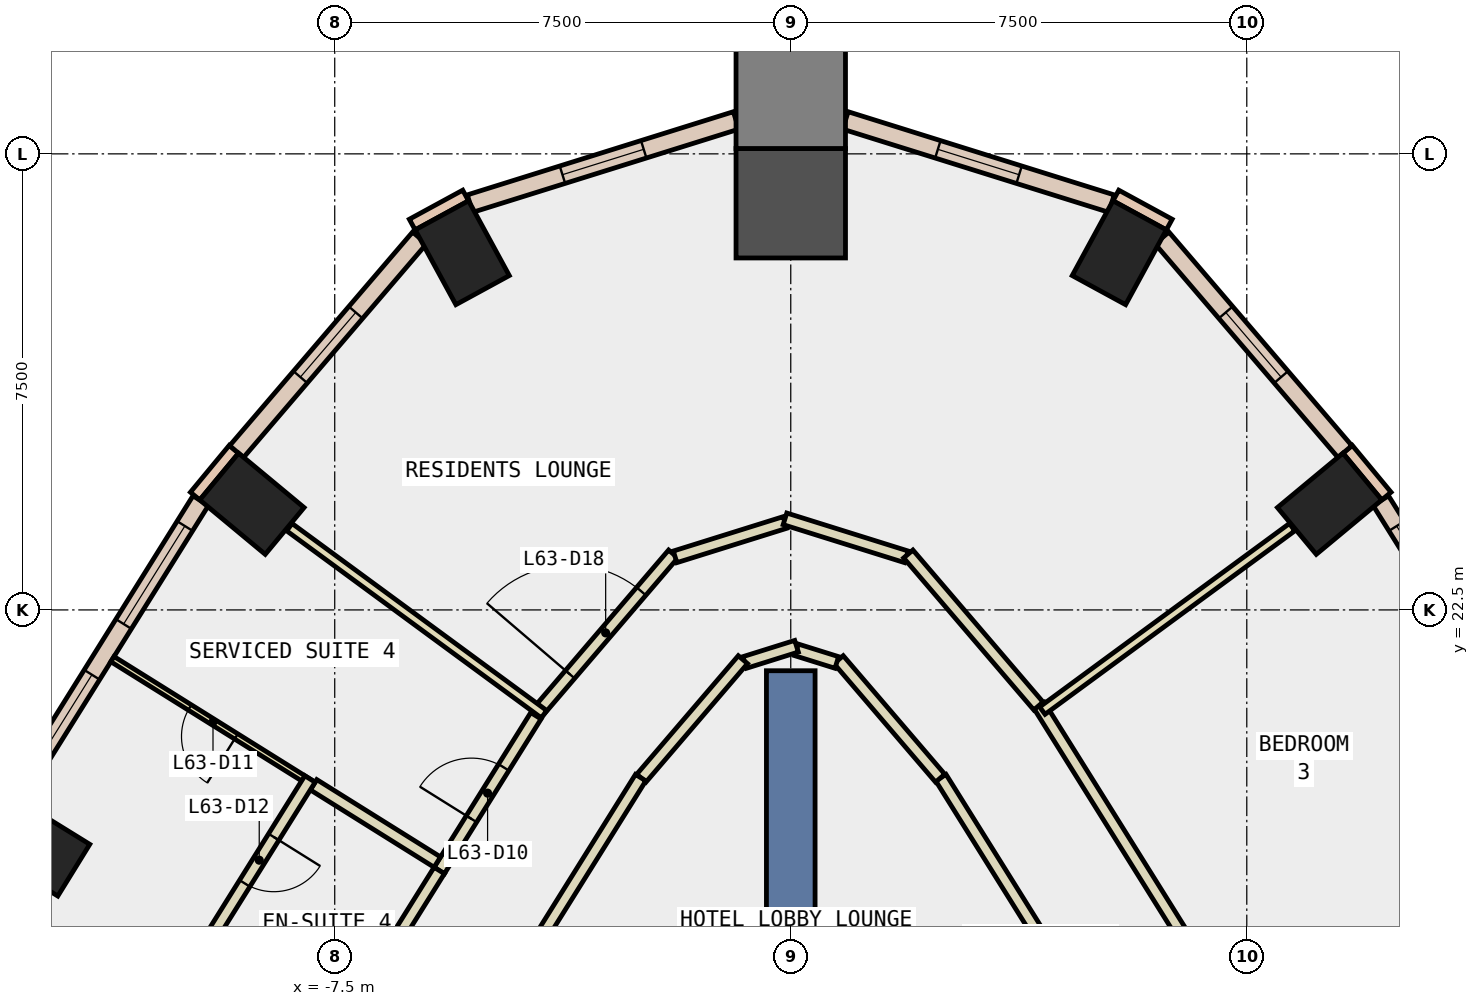
"""IFC4 building model, lengths in metres.
Left out: names, types, materials, properties, quantities, classifications, styles, units other than length and angle.
Written with IfcOpenShell. Run it as: python <this file> out.ifc"""

import sys

from ifc_helpers import new_model, si_unit, direction, frame, frame_2d, origin, origin_2d, place, context, subcontext, project, spatial, rectangle, extrude, element, fill, save


model = new_model("IFC4")
c1 = context("Model", 3, precision=1e-05, world=origin(), true_north=direction((0.0, 1.0)))
c2 = subcontext(c1, "Body", "Model", "MODEL_VIEW")
j1 = project(units=[si_unit("LENGTHUNIT", "METRE"), si_unit("PLANEANGLEUNIT", "RADIAN")], contexts=[c1])
p1 = place(None, origin())
s1 = spatial("IfcSite", under=j1, at=p1, CompositionType="ELEMENT")
p2 = place(p1, origin())
s2 = spatial("IfcBuilding", under=s1, at=p2, CompositionType="ELEMENT")
p3 = place(p2, frame((0.0, 0.0, 273.8)))
s3 = spatial("IfcBuildingStorey", under=s2, at=p3, CompositionType="ELEMENT", Elevation=273.8)
for number, where, z_axis, x_axis in (
    (1, (8.862, 24.246, -0.34), (0.0, 0.0, 1.0), (-0.639, 0.769, 0.0)),
    (2, (5.403, 28.374, -0.34), (0.0, 0.0, 1.0), (-0.878, 0.478, 0.0)),
):
    element("IfcColumn", number, at=place(p3, frame(where, z_axis=z_axis, x_axis=x_axis)), inside=s3, PredefinedType="COLUMN", context=c2, shape_type="SweptSolid", body=[
        extrude(rectangle(XDim=1.0, YDim=1.4, at=origin_2d()), origin(), (0.0, 0.0, 1.0), 3.6),
    ])
p4 = place(p3, frame((0.0, 29.188, -0.34), z_axis=(0.0, 0.0, 1.0), x_axis=(0.0, 1.0, 0.0)))
e3 = element("IfcColumn", 3, at=p4, inside=s3, PredefinedType="COLUMN", context=c2, shape_type="SweptSolid", body=[
    extrude(rectangle(XDim=1.8, YDim=1.8, at=origin_2d()), origin(), (0.0, 0.0, 1.0), 3.6),
])
for number, where, z_axis, x_axis in (
    (4, (-5.403, 28.374, -0.34), (0.0, 0.0, 1.0), (0.878, 0.478, 0.0)),
    (5, (-8.862, 24.246, -0.34), (0.0, 0.0, 1.0), (0.639, 0.769, 0.0)),
    (6, (-12.387, 18.588, -0.34), (0.0, 0.0, 1.0), (0.526, 0.851, 0.0)),
):
    element("IfcColumn", number, at=place(p3, frame(where, z_axis=z_axis, x_axis=x_axis)), inside=s3, PredefinedType="COLUMN", context=c2, shape_type="SweptSolid", body=[
        extrude(rectangle(XDim=1.0, YDim=1.4, at=origin_2d()), origin(), (0.0, 0.0, 1.0), 3.6),
    ])
p5 = place(p3, frame((0.0, 30.988, -0.34), z_axis=(0.0, 0.0, 1.0), x_axis=(0.0, 1.0, 0.0)))
e7 = element("IfcColumn", 7, at=p5, inside=s3, PredefinedType="COLUMN", context=c2, shape_type="SweptSolid", body=[
    extrude(rectangle(XDim=1.8, YDim=1.8, at=origin_2d()), origin(), (0.0, 0.0, 1.0), 3.6),
])
p6 = place(p3, frame((0.0, 12.5, -0.34), z_axis=(0.0, 0.0, 1.0), x_axis=(0.0, 1.0, 0.0)))
e8 = element("IfcWall", 8, at=p6, inside=s3, PredefinedType="SHEAR", context=c2, shape_type="SweptSolid", body=[
    extrude(rectangle(XDim=9.0, YDim=0.8, at=frame_2d((4.5, 0.0))), origin(), (0.0, 0.0, 1.0), 3.6),
])
for number, where, z_axis, x_axis in (
    (9, (6.225, 28.837, 0.0), (0.0, 0.0, 1.0), (-0.878, 0.478, 0.0)),
    (10, (-5.347, 29.315, 0.0), (0.0, 0.0, 1.0), (-0.878, -0.478, 0.0)),
):
    element("IfcWall", number, at=place(p3, frame(where, z_axis=z_axis, x_axis=x_axis)), inside=s3, PredefinedType="STANDARD", context=c2, shape_type="SweptSolid", body=[
        extrude(rectangle(XDim=1.0, YDim=0.2, at=frame_2d((0.5, 0.0))), origin(), (0.0, 0.0, 1.0), 3.26),
    ])
for number, where, z_axis, x_axis in (
    (11, (9.796, 24.372, 0.0), (0.0, 0.0, 1.0), (-0.638, 0.77, 0.0)),
    (12, (-9.158, 25.142, 0.0), (0.0, 0.0, 1.0), (-0.638, -0.77, 0.0)),
):
    element("IfcWall", number, at=place(p3, frame(where, z_axis=z_axis, x_axis=x_axis)), inside=s3, PredefinedType="STANDARD", context=c2, shape_type="SweptSolid", body=[
        extrude(rectangle(XDim=1.0, YDim=0.2, at=frame_2d((0.5, 0.0))), origin(), (0.0, 0.0, 1.0), 3.26),
    ])
p7 = place(p3, frame((12.761, 19.405, 0.0), z_axis=(0.0, 0.0, 1.0), x_axis=(-0.529915244244, 0.848050608111, 0.0)))
e13 = element("IfcWall", 13, at=p7, inside=s3, PredefinedType="STANDARD", context=c2, shape_type="SweptSolid", body=[
    extrude(rectangle(XDim=5.769, YDim=0.3, at=frame_2d((2.884, 0.0))), origin(), (0.0, 0.0, 1.0), 3.26),
])
p8 = place(p7, frame((0.492, 0.0, 0.9)))
e14 = element("IfcOpeningElement", 14, at=p8, cuts=e13, PredefinedType="OPENING", context=c2, shape_type="SweptSolid", body=[
    extrude(rectangle(XDim=1.9, YDim=2.0, at=frame_2d((0.95, 1.0))), frame((0.0, 0.16, 0.0), z_axis=(0.0, -1.0, 0.0), x_axis=(1.0, 0.0, 0.0)), (0.0, 0.0, 1.0), 0.32),
])
p9 = place(p7, frame((3.376, 0.0, 0.9)))
e15 = element("IfcOpeningElement", 15, at=p9, cuts=e13, PredefinedType="OPENING", context=c2, shape_type="SweptSolid", body=[
    extrude(rectangle(XDim=1.9, YDim=2.0, at=frame_2d((0.95, 1.0))), frame((0.0, 0.16, 0.0), z_axis=(0.0, -1.0, 0.0), x_axis=(1.0, 0.0, 0.0)), (0.0, 0.0, 1.0), 0.32),
])
p10 = place(p3, frame((9.114, 25.104, 0.0), z_axis=(0.0, 0.0, 1.0), x_axis=(-0.650534879197, 0.759476379454, 0.0)))
e16 = element("IfcWall", 16, at=p10, inside=s3, PredefinedType="STANDARD", context=c2, shape_type="SweptSolid", body=[
    extrude(rectangle(XDim=4.625, YDim=0.3, at=frame_2d((2.313, 0.0))), origin(), (0.0, 0.0, 1.0), 3.26),
])
p11 = place(p10, frame((1.613, 0.0, 0.9)))
e17 = element("IfcOpeningElement", 17, at=p11, cuts=e16, PredefinedType="OPENING", context=c2, shape_type="SweptSolid", body=[
    extrude(rectangle(XDim=1.4, YDim=2.0, at=frame_2d((0.7, 1.0))), frame((0.0, 0.16, 0.0), z_axis=(0.0, -1.0, 0.0), x_axis=(1.0, 0.0, 0.0)), (0.0, 0.0, 1.0), 0.32),
])
p12 = place(p3, frame((5.275, 29.182, 0.0), z_axis=(0.0, 0.0, 1.0), x_axis=(-0.954438278963, 0.298408397417, 0.0)))
e18 = element("IfcWall", 18, at=p12, inside=s3, PredefinedType="STANDARD", context=c2, shape_type="SweptSolid", body=[
    extrude(rectangle(XDim=4.585, YDim=0.3, at=frame_2d((2.292, 0.0))), origin(), (0.0, 0.0, 1.0), 3.26),
])
p13 = place(p12, frame((1.592, 0.0, 0.9)))
e19 = element("IfcOpeningElement", 19, at=p13, cuts=e18, PredefinedType="OPENING", context=c2, shape_type="SweptSolid", body=[
    extrude(rectangle(XDim=1.4, YDim=2.0, at=frame_2d((0.7, 1.0))), frame((0.0, 0.16, 0.0), z_axis=(0.0, -1.0, 0.0), x_axis=(1.0, 0.0, 0.0)), (0.0, 0.0, 1.0), 0.32),
])
p14 = place(p3, frame((-0.899, 30.55, 0.0), z_axis=(0.0, 0.0, 1.0), x_axis=(-0.954438278963, -0.298408397417, 0.0)))
e20 = element("IfcWall", 20, at=p14, inside=s3, PredefinedType="STANDARD", context=c2, shape_type="SweptSolid", body=[
    extrude(rectangle(XDim=4.585, YDim=0.3, at=frame_2d((2.292, 0.0))), origin(), (0.0, 0.0, 1.0), 3.26),
])
p15 = place(p14, frame((1.592, 0.0, 0.9)))
e21 = element("IfcOpeningElement", 21, at=p15, cuts=e20, PredefinedType="OPENING", context=c2, shape_type="SweptSolid", body=[
    extrude(rectangle(XDim=1.4, YDim=2.0, at=frame_2d((0.7, 1.0))), frame((0.0, 0.16, 0.0), z_axis=(0.0, -1.0, 0.0), x_axis=(1.0, 0.0, 0.0)), (0.0, 0.0, 1.0), 0.32),
])
p16 = place(p3, frame((-6.105, 28.617, 0.0), z_axis=(0.0, 0.0, 1.0), x_axis=(-0.650534879197, -0.759476379454, 0.0)))
e22 = element("IfcWall", 22, at=p16, inside=s3, PredefinedType="STANDARD", context=c2, shape_type="SweptSolid", body=[
    extrude(rectangle(XDim=4.625, YDim=0.3, at=frame_2d((2.313, 0.0))), origin(), (0.0, 0.0, 1.0), 3.26),
])
p17 = place(p16, frame((1.613, 0.0, 0.9)))
e23 = element("IfcOpeningElement", 23, at=p17, cuts=e22, PredefinedType="OPENING", context=c2, shape_type="SweptSolid", body=[
    extrude(rectangle(XDim=1.4, YDim=2.0, at=frame_2d((0.7, 1.0))), frame((0.0, 0.16, 0.0), z_axis=(0.0, -1.0, 0.0), x_axis=(1.0, 0.0, 0.0)), (0.0, 0.0, 1.0), 0.32),
])
p18 = place(p3, frame((-9.704, 24.297, 0.0), z_axis=(0.0, 0.0, 1.0), x_axis=(-0.529915244244, -0.848050608111, 0.0)))
e24 = element("IfcWall", 24, at=p18, inside=s3, PredefinedType="STANDARD", context=c2, shape_type="SweptSolid", body=[
    extrude(rectangle(XDim=5.769, YDim=0.3, at=frame_2d((2.884, 0.0))), origin(), (0.0, 0.0, 1.0), 3.26),
])
p19 = place(p18, frame((0.492, 0.0, 0.9)))
e25 = element("IfcOpeningElement", 25, at=p19, cuts=e24, PredefinedType="OPENING", context=c2, shape_type="SweptSolid", body=[
    extrude(rectangle(XDim=1.9, YDim=2.0, at=frame_2d((0.95, 1.0))), frame((0.0, 0.16, 0.0), z_axis=(0.0, -1.0, 0.0), x_axis=(1.0, 0.0, 0.0)), (0.0, 0.0, 1.0), 0.32),
])
p20 = place(p18, frame((3.376, 0.0, 0.9)))
e26 = element("IfcOpeningElement", 26, at=p20, cuts=e24, PredefinedType="OPENING", context=c2, shape_type="SweptSolid", body=[
    extrude(rectangle(XDim=1.9, YDim=2.0, at=frame_2d((0.95, 1.0))), frame((0.0, 0.16, 0.0), z_axis=(0.0, -1.0, 0.0), x_axis=(1.0, 0.0, 0.0)), (0.0, 0.0, 1.0), 0.32),
])
p21 = place(p3, frame((5.734, 14.516, 0.0), z_axis=(0.0, 0.0, 1.0), x_axis=(-0.529852912827, 0.848089553508, 0.0)))
e27 = element("IfcWall", 27, at=p21, inside=s3, PredefinedType="PARTITIONING", context=c2, shape_type="SweptSolid", body=[
    extrude(rectangle(XDim=6.162, YDim=0.2, at=frame_2d((3.081, 0.0))), origin(), (0.0, 0.0, 1.0), 3.26),
])
p22 = place(p3, frame((2.457, 19.733, 0.0), z_axis=(0.0, 0.0, 1.0), x_axis=(-0.650650354416, 0.759377453114, 0.0)))
e28 = element("IfcWall", 28, at=p22, inside=s3, PredefinedType="PARTITIONING", context=c2, shape_type="SweptSolid", body=[
    extrude(rectangle(XDim=2.567, YDim=0.2, at=frame_2d((1.283, 0.0))), origin(), (0.0, 0.0, 1.0), 3.26),
])
p23 = place(p3, frame((0.757, 21.636, 0.0), z_axis=(0.0, 0.0, 1.0), x_axis=(-0.954429868001, 0.298435297959, 0.0)))
e29 = element("IfcWall", 29, at=p23, inside=s3, PredefinedType="PARTITIONING", context=c2, shape_type="SweptSolid", body=[
    extrude(rectangle(XDim=0.694, YDim=0.2, at=frame_2d((0.347, 0.0))), origin(), (0.0, 0.0, 1.0), 3.26),
])
p24 = place(p3, frame((0.095, 21.903, 0.0), z_axis=(0.0, 0.0, 1.0), x_axis=(-0.954216896292, -0.299115554311, 0.0)))
e30 = element("IfcWall", 30, at=p24, inside=s3, PredefinedType="PARTITIONING", context=c2, shape_type="SweptSolid", body=[
    extrude(rectangle(XDim=0.893, YDim=0.2, at=frame_2d((0.446, 0.0))), origin(), (0.0, 0.0, 1.0), 3.26),
])
p25 = place(p3, frame((-0.787, 21.682, 0.0), z_axis=(0.0, 0.0, 1.0), x_axis=(-0.650650354416, -0.759377453114, 0.0)))
e31 = element("IfcWall", 31, at=p25, inside=s3, PredefinedType="PARTITIONING", context=c2, shape_type="SweptSolid", body=[
    extrude(rectangle(XDim=2.567, YDim=0.2, at=frame_2d((1.283, 0.0))), origin(), (0.0, 0.0, 1.0), 3.26),
])
p26 = place(p3, frame((-2.469, 19.742, 0.0), z_axis=(0.0, 0.0, 1.0), x_axis=(-0.529852912827, -0.848089553508, 0.0)))
e32 = element("IfcWall", 32, at=p26, inside=s3, PredefinedType="PARTITIONING", context=c2, shape_type="SweptSolid", body=[
    extrude(rectangle(XDim=6.162, YDim=0.2, at=frame_2d((3.081, 0.0))), origin(), (0.0, 0.0, 1.0), 3.26),
])
p27 = place(p3, frame((4.085, 20.929, 0.0), z_axis=(0.0, 0.0, 1.0), x_axis=(0.530002406791, -0.847996137253, 0.0)))
e33 = element("IfcWall", 33, at=p27, inside=s3, PredefinedType="PARTITIONING", context=c2, shape_type="SweptSolid", body=[
    extrude(rectangle(XDim=6.33, YDim=0.2, at=frame_2d((3.165, 0.0))), origin(), (0.0, 0.0, 1.0), 3.26),
])
p28 = place(p3, frame((-4.155, 20.825, 0.0), z_axis=(0.0, 0.0, 1.0), x_axis=(0.650396970678, 0.75959448427, 0.0)))
e34 = element("IfcWall", 34, at=p28, inside=s3, PredefinedType="PARTITIONING", context=c2, shape_type="SweptSolid", body=[
    extrude(rectangle(XDim=3.416, YDim=0.2, at=frame_2d((1.708, 0.0))), origin(), (0.0, 0.0, 1.0), 3.26),
])
p29 = place(p28, frame((0.808, 0.0, 0.0)))
e35 = element("IfcOpeningElement", 35, at=p29, cuts=e34, PredefinedType="OPENING", context=c2, shape_type="SweptSolid", body=[
    extrude(rectangle(XDim=1.8, YDim=2.1, at=frame_2d((0.9, 1.05))), frame((0.0, 0.11, 0.0), z_axis=(0.0, -1.0, 0.0), x_axis=(1.0, 0.0, 0.0)), (0.0, 0.0, 1.0), 0.22),
])
p30 = place(p3, frame((-1.902, 23.373, 0.0), z_axis=(0.0, 0.0, 1.0), x_axis=(0.954447851072, 0.298377779976, 0.0)))
e36 = element("IfcWall", 36, at=p30, inside=s3, PredefinedType="PARTITIONING", context=c2, shape_type="SweptSolid", body=[
    extrude(rectangle(XDim=1.893, YDim=0.2, at=frame_2d((0.947, 0.0))), origin(), (0.0, 0.0, 1.0), 3.26),
])
p31 = place(p3, frame((-0.095, 23.998, 0.0), z_axis=(0.0, 0.0, 1.0), x_axis=(0.954355336779, -0.298673552831, 0.0)))
e37 = element("IfcWall", 37, at=p31, inside=s3, PredefinedType="PARTITIONING", context=c2, shape_type="SweptSolid", body=[
    extrude(rectangle(XDim=2.093, YDim=0.2, at=frame_2d((1.046, 0.0))), origin(), (0.0, 0.0, 1.0), 3.26),
])
p32 = place(p3, frame((1.933, 23.42, 0.0), z_axis=(0.0, 0.0, 1.0), x_axis=(0.65027189398, -0.759701562391, 0.0)))
e38 = element("IfcWall", 38, at=p32, inside=s3, PredefinedType="PARTITIONING", context=c2, shape_type="SweptSolid", body=[
    extrude(rectangle(XDim=3.291, YDim=0.2, at=frame_2d((1.646, 0.0))), origin(), (0.0, 0.0, 1.0), 3.26),
])
p33 = place(p3, frame((-5.781, 18.215, 0.0), z_axis=(0.0, 0.0, 1.0), x_axis=(0.530028199927, 0.847980015851, 0.0)))
e39 = element("IfcWall", 39, at=p33, inside=s3, PredefinedType="PARTITIONING", context=c2, shape_type="SweptSolid", body=[
    extrude(rectangle(XDim=3.0, YDim=0.2, at=frame_2d((1.5, 0.0))), origin(), (0.0, 0.0, 1.0), 3.26),
])
p34 = place(p33, frame((1.0, 0.0, 0.0)))
e40 = element("IfcOpeningElement", 40, at=p34, cuts=e39, PredefinedType="OPENING", context=c2, shape_type="SweptSolid", body=[
    extrude(rectangle(XDim=1.0, YDim=2.1, at=frame_2d((0.5, 1.05))), frame((0.0, 0.11, 0.0), z_axis=(0.0, -1.0, 0.0), x_axis=(1.0, 0.0, 0.0)), (0.0, 0.0, 1.0), 0.22),
])
p35 = place(p3, frame((-7.371, 15.671, 0.0), z_axis=(0.0, 0.0, 1.0), x_axis=(0.529991625428, 0.84800287557, 0.0)))
e41 = element("IfcWall", 41, at=p35, inside=s3, PredefinedType="PARTITIONING", context=c2, shape_type="SweptSolid", body=[
    extrude(rectangle(XDim=3.0, YDim=0.2, at=frame_2d((1.5, 0.0))), origin(), (0.0, 0.0, 1.0), 3.26),
])
p36 = place(p3, frame((4.138, 20.844, 0.0), z_axis=(0.0, 0.0, 1.0), x_axis=(0.805989075855, 0.591930409426, 0.0)))
e42 = element("IfcWall", 42, at=p36, inside=s3, PredefinedType="PARTITIONING", context=c2, shape_type="SweptSolid", body=[
    extrude(rectangle(XDim=5.097, YDim=0.15, at=frame_2d((2.548, 0.0))), origin(), (0.0, 0.0, 1.0), 3.26),
])
p37 = place(p3, frame((-4.058, 20.785, 0.0), z_axis=(0.0, 0.0, 1.0), x_axis=(-0.805947688418, 0.591986759593, 0.0)))
e43 = element("IfcWall", 43, at=p37, inside=s3, PredefinedType="PARTITIONING", context=c2, shape_type="SweptSolid", body=[
    extrude(rectangle(XDim=5.196, YDim=0.15, at=frame_2d((2.598, 0.0))), origin(), (0.0, 0.0, 1.0), 3.26),
])
p38 = place(p3, frame((-7.848, 19.625, 0.0), z_axis=(0.0, 0.0, 1.0), x_axis=(-0.848188150314, 0.529695064794, 0.0)))
e44 = element("IfcWall", 44, at=p38, inside=s3, PredefinedType="PARTITIONING", context=c2, shape_type="SweptSolid", body=[
    extrude(rectangle(XDim=3.9, YDim=0.1, at=frame_2d((1.95, 0.0))), origin(), (0.0, 0.0, 1.0), 3.26),
])
p39 = place(p38, frame((1.5, 0.0, 0.0)))
e45 = element("IfcOpeningElement", 45, at=p39, cuts=e44, PredefinedType="OPENING", context=c2, shape_type="SweptSolid", body=[
    extrude(rectangle(XDim=0.9, YDim=2.1, at=frame_2d((0.45, 1.05))), frame((0.0, 0.06, 0.0), z_axis=(0.0, -1.0, 0.0), x_axis=(1.0, 0.0, 0.0)), (0.0, 0.0, 1.0), 0.12),
])
p40 = place(p3, frame((-5.813, 18.353, 0.0), z_axis=(0.0, 0.0, 1.0), x_axis=(-0.847969725239, 0.530044663287, 0.0)))
e46 = element("IfcWall", 46, at=p40, inside=s3, PredefinedType="PARTITIONING", context=c2, shape_type="SweptSolid", body=[
    extrude(rectangle(XDim=2.4, YDim=0.2, at=frame_2d((1.2, 0.0))), origin(), (0.0, 0.0, 1.0), 3.26),
])
p41 = place(p3, frame((-7.907, 19.72, 0.0), z_axis=(0.0, 0.0, 1.0), x_axis=(-0.529915322147, -0.848050559433, 0.0)))
e47 = element("IfcWall", 47, at=p41, inside=s3, PredefinedType="PARTITIONING", context=c2, shape_type="SweptSolid", body=[
    extrude(rectangle(XDim=3.149, YDim=0.2, at=frame_2d((1.575, 0.0))), origin(), (0.0, 0.0, 1.0), 3.26),
])
p42 = place(p41, frame((1.125, 0.0, 0.0)))
e48 = element("IfcOpeningElement", 48, at=p42, cuts=e47, PredefinedType="OPENING", context=c2, shape_type="SweptSolid", body=[
    extrude(rectangle(XDim=0.9, YDim=2.1, at=frame_2d((0.45, 1.05))), frame((0.0, 0.11, 0.0), z_axis=(0.0, -1.0, 0.0), x_axis=(1.0, 0.0, 0.0)), (0.0, 0.0, 1.0), 0.22),
])
p43 = place(p9, origin())
e49 = element("IfcWindow", 49, at=p43, inside=s3, PartitioningType="SINGLE_PANEL", PredefinedType="WINDOW", context=c2, shape_type="SweptSolid", body=[
    extrude(rectangle(XDim=1.9, YDim=2.0, at=frame_2d((0.95, 1.0))), frame((0.0, 0.03, 0.0), z_axis=(0.0, -1.0, 0.0), x_axis=(1.0, 0.0, 0.0)), (0.0, 0.0, 1.0), 0.06),
])
fill(e15, e49)
p44 = place(p11, origin())
e50 = element("IfcWindow", 50, at=p44, inside=s3, PartitioningType="SINGLE_PANEL", PredefinedType="WINDOW", context=c2, shape_type="SweptSolid", body=[
    extrude(rectangle(XDim=1.4, YDim=2.0, at=frame_2d((0.7, 1.0))), frame((0.0, 0.03, 0.0), z_axis=(0.0, -1.0, 0.0), x_axis=(1.0, 0.0, 0.0)), (0.0, 0.0, 1.0), 0.06),
])
fill(e17, e50)
p45 = place(p13, origin())
e51 = element("IfcWindow", 51, at=p45, inside=s3, PartitioningType="SINGLE_PANEL", PredefinedType="WINDOW", context=c2, shape_type="SweptSolid", body=[
    extrude(rectangle(XDim=1.4, YDim=2.0, at=frame_2d((0.7, 1.0))), frame((0.0, 0.03, 0.0), z_axis=(0.0, -1.0, 0.0), x_axis=(1.0, 0.0, 0.0)), (0.0, 0.0, 1.0), 0.06),
])
fill(e19, e51)
p46 = place(p15, origin())
e52 = element("IfcWindow", 52, at=p46, inside=s3, PartitioningType="SINGLE_PANEL", PredefinedType="WINDOW", context=c2, shape_type="SweptSolid", body=[
    extrude(rectangle(XDim=1.4, YDim=2.0, at=frame_2d((0.7, 1.0))), frame((0.0, 0.03, 0.0), z_axis=(0.0, -1.0, 0.0), x_axis=(1.0, 0.0, 0.0)), (0.0, 0.0, 1.0), 0.06),
])
fill(e21, e52)
p47 = place(p17, origin())
e53 = element("IfcWindow", 53, at=p47, inside=s3, PartitioningType="SINGLE_PANEL", PredefinedType="WINDOW", context=c2, shape_type="SweptSolid", body=[
    extrude(rectangle(XDim=1.4, YDim=2.0, at=frame_2d((0.7, 1.0))), frame((0.0, 0.03, 0.0), z_axis=(0.0, -1.0, 0.0), x_axis=(1.0, 0.0, 0.0)), (0.0, 0.0, 1.0), 0.06),
])
fill(e23, e53)
p48 = place(p19, origin())
e54 = element("IfcWindow", 54, at=p48, inside=s3, PartitioningType="SINGLE_PANEL", PredefinedType="WINDOW", context=c2, shape_type="SweptSolid", body=[
    extrude(rectangle(XDim=1.9, YDim=2.0, at=frame_2d((0.95, 1.0))), frame((0.0, 0.03, 0.0), z_axis=(0.0, -1.0, 0.0), x_axis=(1.0, 0.0, 0.0)), (0.0, 0.0, 1.0), 0.06),
])
fill(e25, e54)
p49 = place(p20, origin())
e55 = element("IfcWindow", 55, at=p49, inside=s3, PartitioningType="SINGLE_PANEL", PredefinedType="WINDOW", context=c2, shape_type="SweptSolid", body=[
    extrude(rectangle(XDim=1.9, YDim=2.0, at=frame_2d((0.95, 1.0))), frame((0.0, 0.03, 0.0), z_axis=(0.0, -1.0, 0.0), x_axis=(1.0, 0.0, 0.0)), (0.0, 0.0, 1.0), 0.06),
])
fill(e26, e55)
p50 = place(p34, origin())
e56 = element("IfcDoor", 56, at=p50, inside=s3, OperationType="SINGLE_SWING_RIGHT", PredefinedType="DOOR", context=c2, shape_type="SweptSolid", body=[
    extrude(rectangle(XDim=1.0, YDim=2.1, at=frame_2d((0.5, 1.05))), frame((0.0, 0.025, 0.0), z_axis=(0.0, -1.0, 0.0), x_axis=(1.0, 0.0, 0.0)), (0.0, 0.0, 1.0), 0.05),
])
fill(e40, e56)
p51 = place(p39, origin())
e57 = element("IfcDoor", 57, at=p51, inside=s3, OperationType="SINGLE_SWING_RIGHT", PredefinedType="DOOR", context=c2, shape_type="SweptSolid", body=[
    extrude(rectangle(XDim=0.9, YDim=2.1, at=frame_2d((0.45, 1.05))), frame((0.0, 0.025, 0.0), z_axis=(0.0, -1.0, 0.0), x_axis=(1.0, 0.0, 0.0)), (0.0, 0.0, 1.0), 0.05),
])
fill(e45, e57)
p52 = place(p42, origin())
e58 = element("IfcDoor", 58, at=p52, inside=s3, OperationType="SINGLE_SWING_LEFT", PredefinedType="DOOR", context=c2, shape_type="SweptSolid", body=[
    extrude(rectangle(XDim=0.9, YDim=2.1, at=frame_2d((0.45, 1.05))), frame((0.0, 0.025, 0.0), z_axis=(0.0, -1.0, 0.0), x_axis=(1.0, 0.0, 0.0)), (0.0, 0.0, 1.0), 0.05),
])
fill(e48, e58)
p53 = place(p29, origin())
e59 = element("IfcDoor", 59, at=p53, inside=s3, OperationType="DOUBLE_DOOR_SINGLE_SWING", PredefinedType="DOOR", context=c2, shape_type="SweptSolid", body=[
    extrude(rectangle(XDim=1.8, YDim=2.1, at=frame_2d((0.9, 1.05))), frame((0.0, 0.025, 0.0), z_axis=(0.0, -1.0, 0.0), x_axis=(1.0, 0.0, 0.0)), (0.0, 0.0, 1.0), 0.05),
])
fill(e35, e59)
save(model, sys.argv[1])
